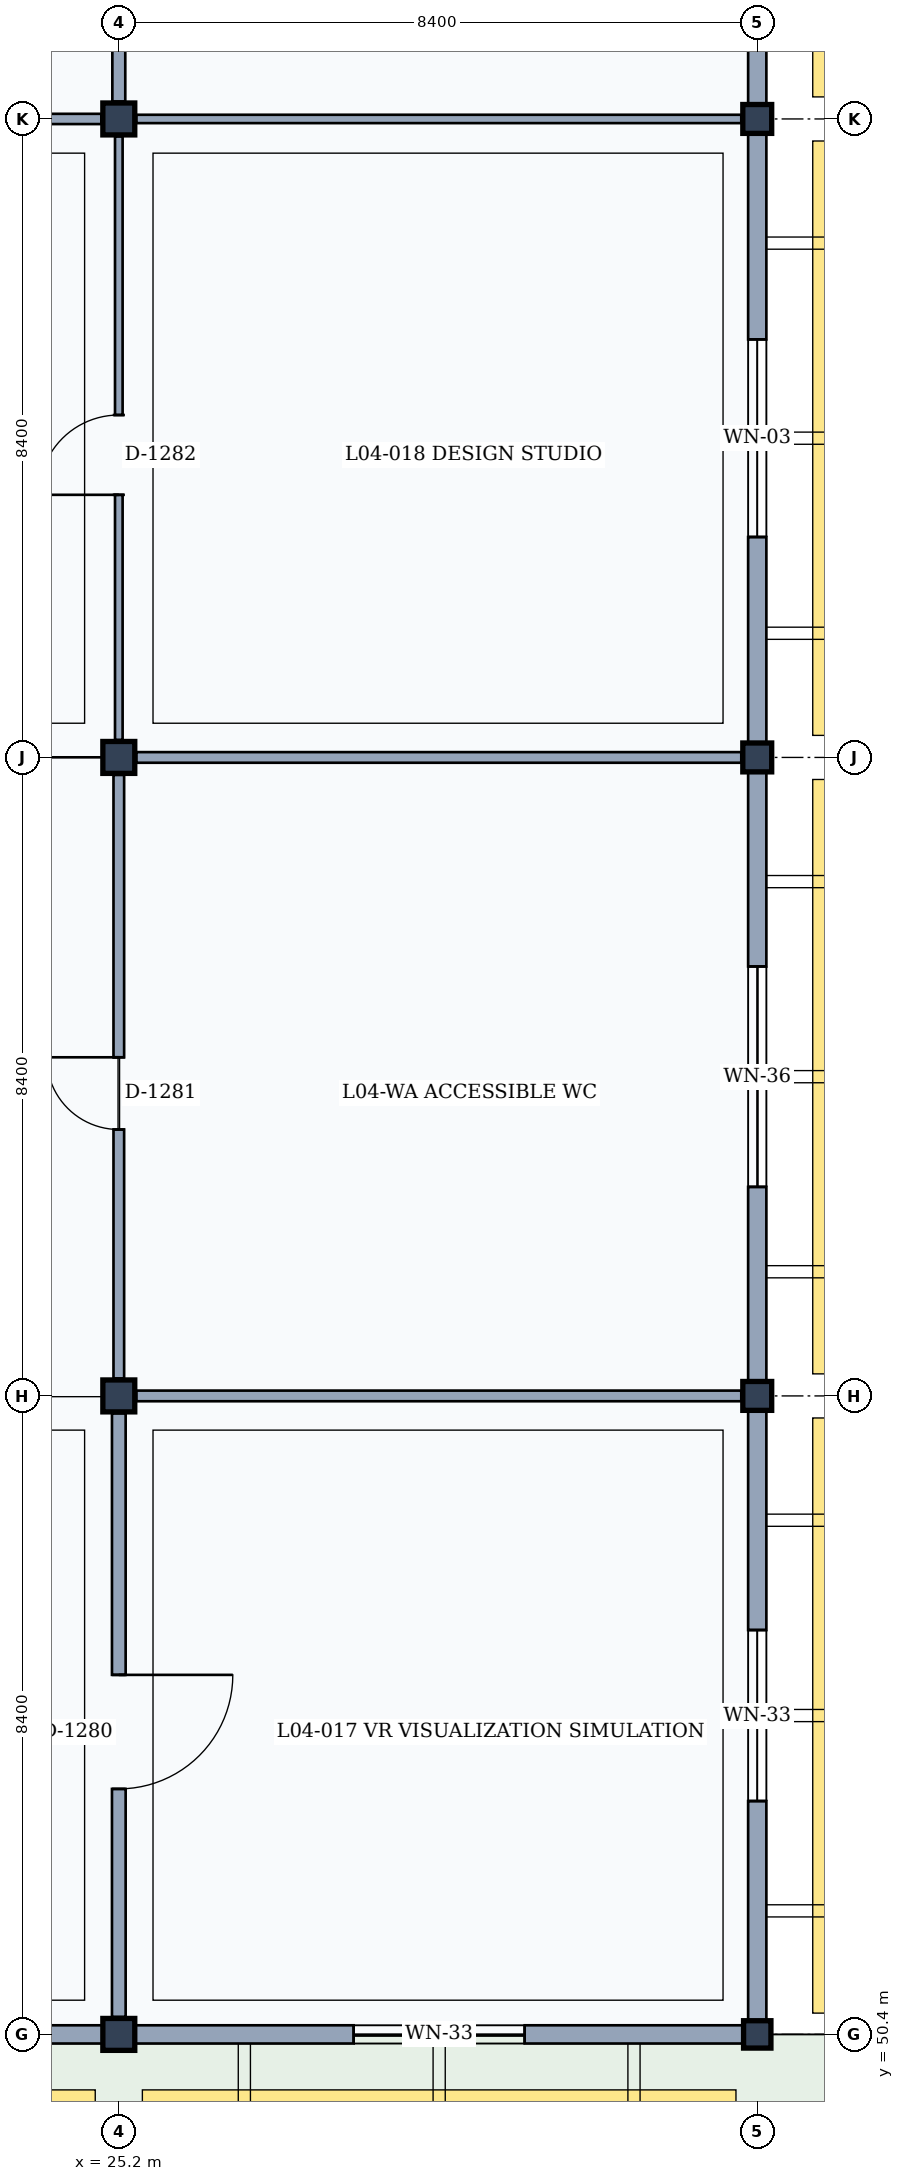
"""IFC4 building model, lengths in metres.
Left out: names, types, materials, properties, quantities, classifications, styles, units other than length and angle.
Written with IfcOpenShell. Run it as: python <this file> out.ifc"""

import sys

from ifc_helpers import new_model, si_unit, direction, frame, frame_2d, origin, origin_2d, place, context, subcontext, project, spatial, rectangle, extrude, element, fill, save


model = new_model("IFC4")
c1 = context("Model", 3, precision=1e-05, world=origin(), true_north=direction((0.0, 1.0)))
c2 = subcontext(c1, "Body", "Model", "MODEL_VIEW")
j1 = project(units=[si_unit("LENGTHUNIT", "METRE"), si_unit("PLANEANGLEUNIT", "RADIAN")], contexts=[c1])
p1 = place(None, origin())
s1 = spatial("IfcSite", under=j1, at=p1, CompositionType="ELEMENT")
p2 = place(p1, origin())
s2 = spatial("IfcBuilding", under=s1, at=p2, CompositionType="ELEMENT")
p3 = place(p2, frame((0.0, 0.0, 18.0)))
s3 = spatial("IfcBuildingStorey", under=s2, at=p3, CompositionType="ELEMENT", Elevation=18.0)
for number, where, z_axis, x_axis in (
    (1, (25.2, 50.4, 0.0), (0.0, 0.0, 1.0), (1.0, 0.0, 0.0)),
    (2, (25.2, 58.8, 0.0), (0.0, 0.0, 1.0), (1.0, 0.0, 0.0)),
    (3, (25.2, 67.2, 0.0), (0.0, 0.0, 1.0), (1.0, 0.0, 0.0)),
    (4, (25.2, 75.6, 0.0), (0.0, 0.0, 1.0), (1.0, 0.0, 0.0)),
):
    element("IfcColumn", number, at=place(p3, frame(where, z_axis=z_axis, x_axis=x_axis)), inside=s3, PredefinedType="COLUMN", context=c2, shape_type="SweptSolid", body=[
        extrude(rectangle(XDim=0.42, YDim=0.42, at=origin_2d()), origin(), (0.0, 0.0, 1.0), 4.2),
    ])
p4 = place(p3, frame((33.6, 50.4, 0.0), z_axis=(0.0, 0.0, 1.0), x_axis=(1.0, 0.0, 0.0)))
e5 = element("IfcColumn", 5, at=p4, inside=s3, PredefinedType="COLUMN", context=c2, shape_type="SweptSolid", body=[
    extrude(rectangle(XDim=0.36, YDim=0.36, at=origin_2d()), origin(), (0.0, 0.0, 1.0), 4.2),
])
for number, where, z_axis, x_axis in (
    (6, (33.6, 58.8, 0.0), (0.0, 0.0, 1.0), (1.0, 0.0, 0.0)),
    (7, (33.6, 67.2, 0.0), (0.0, 0.0, 1.0), (1.0, 0.0, 0.0)),
    (8, (33.6, 75.6, 0.0), (0.0, 0.0, 1.0), (1.0, 0.0, 0.0)),
):
    element("IfcColumn", number, at=place(p3, frame(where, z_axis=z_axis, x_axis=x_axis)), inside=s3, PredefinedType="COLUMN", context=c2, shape_type="SweptSolid", body=[
        extrude(rectangle(XDim=0.38, YDim=0.38, at=origin_2d()), origin(), (0.0, 0.0, 1.0), 4.2),
    ])
p5 = place(p3, frame((24.99, 50.4, 0.0), z_axis=(0.0, 0.0, 1.0), x_axis=(-1.0, 0.0, 0.0)))
e9 = element("IfcWall", 9, at=p5, inside=s3, PredefinedType="SOLIDWALL", context=c2, shape_type="SweptSolid", body=[
    extrude(rectangle(XDim=7.98, YDim=0.24, at=frame_2d((3.99, 0.0))), origin(), (0.0, 0.0, 1.0), 3.36),
])
p6 = place(p5, frame((2.615, 0.0, 0.9)))
e10 = element("IfcOpeningElement", 10, at=p6, cuts=e9, PredefinedType="OPENING", context=c2, shape_type="SweptSolid", body=[
    extrude(rectangle(XDim=2.75, YDim=1.85, at=frame_2d((1.375, 0.925))), frame((0.0, 0.13, 0.0), z_axis=(0.0, -1.0, 0.0), x_axis=(1.0, 0.0, 0.0)), (0.0, 0.0, 1.0), 0.26),
])
p7 = place(p3, frame((33.42, 50.4, 0.0), z_axis=(0.0, 0.0, 1.0), x_axis=(-1.0, 0.0, 0.0)))
e11 = element("IfcWall", 11, at=p7, inside=s3, PredefinedType="SOLIDWALL", context=c2, shape_type="SweptSolid", body=[
    extrude(rectangle(XDim=8.01, YDim=0.24, at=frame_2d((4.005, 0.0))), origin(), (0.0, 0.0, 1.0), 3.36),
])
p8 = place(p7, frame((2.88, 0.0, 0.9)))
e12 = element("IfcOpeningElement", 12, at=p8, cuts=e11, PredefinedType="OPENING", context=c2, shape_type="SweptSolid", body=[
    extrude(rectangle(XDim=2.25, YDim=1.6, at=frame_2d((1.125, 0.8))), frame((0.0, 0.13, 0.0), z_axis=(0.0, -1.0, 0.0), x_axis=(1.0, 0.0, 0.0)), (0.0, 0.0, 1.0), 0.26),
])
p9 = place(p3, frame((33.6, 58.61, 0.0), z_axis=(0.0, 0.0, 1.0), x_axis=(0.0, -1.0, 0.0)))
e13 = element("IfcWall", 13, at=p9, inside=s3, PredefinedType="SOLIDWALL", context=c2, shape_type="SweptSolid", body=[
    extrude(rectangle(XDim=8.03, YDim=0.24, at=frame_2d((4.015, 0.0))), origin(), (0.0, 0.0, 1.0), 3.36),
])
p10 = place(p9, frame((2.89, 0.0, 0.9)))
e14 = element("IfcOpeningElement", 14, at=p10, cuts=e13, PredefinedType="OPENING", context=c2, shape_type="SweptSolid", body=[
    extrude(rectangle(XDim=2.25, YDim=1.6, at=frame_2d((1.125, 0.8))), frame((0.0, 0.13, 0.0), z_axis=(0.0, -1.0, 0.0), x_axis=(1.0, 0.0, 0.0)), (0.0, 0.0, 1.0), 0.26),
])
p11 = place(p3, frame((33.6, 67.01, 0.0), z_axis=(0.0, 0.0, 1.0), x_axis=(0.0, -1.0, 0.0)))
e15 = element("IfcWall", 15, at=p11, inside=s3, PredefinedType="SOLIDWALL", context=c2, shape_type="SweptSolid", body=[
    extrude(rectangle(XDim=8.02, YDim=0.24, at=frame_2d((4.01, 0.0))), origin(), (0.0, 0.0, 1.0), 3.36),
])
p12 = place(p11, frame((2.56, 0.0, 0.9)))
e16 = element("IfcOpeningElement", 16, at=p12, cuts=e15, PredefinedType="OPENING", context=c2, shape_type="SweptSolid", body=[
    extrude(rectangle(XDim=2.9, YDim=1.75, at=frame_2d((1.45, 0.875))), frame((0.0, 0.13, 0.0), z_axis=(0.0, -1.0, 0.0), x_axis=(1.0, 0.0, 0.0)), (0.0, 0.0, 1.0), 0.26),
])
p13 = place(p3, frame((33.6, 75.41, 0.0), z_axis=(0.0, 0.0, 1.0), x_axis=(0.0, -1.0, 0.0)))
e17 = element("IfcWall", 17, at=p13, inside=s3, PredefinedType="SOLIDWALL", context=c2, shape_type="SweptSolid", body=[
    extrude(rectangle(XDim=8.02, YDim=0.24, at=frame_2d((4.01, 0.0))), origin(), (0.0, 0.0, 1.0), 3.36),
])
p14 = place(p13, frame((2.71, 0.0, 0.9)))
e18 = element("IfcOpeningElement", 18, at=p14, cuts=e17, PredefinedType="OPENING", context=c2, shape_type="SweptSolid", body=[
    extrude(rectangle(XDim=2.6, YDim=2.1, at=frame_2d((1.3, 1.05))), frame((0.0, 0.13, 0.0), z_axis=(0.0, -1.0, 0.0), x_axis=(1.0, 0.0, 0.0)), (0.0, 0.0, 1.0), 0.26),
])
p15 = place(p3, frame((33.6, 83.81, 0.0), z_axis=(0.0, 0.0, 1.0), x_axis=(0.0, -1.0, 0.0)))
e19 = element("IfcWall", 19, at=p15, inside=s3, PredefinedType="SOLIDWALL", context=c2, shape_type="SweptSolid", body=[
    extrude(rectangle(XDim=8.02, YDim=0.24, at=frame_2d((4.01, 0.0))), origin(), (0.0, 0.0, 1.0), 3.36),
])
p16 = place(p15, frame((3.51, 0.0, 0.9)))
e20 = element("IfcOpeningElement", 20, at=p16, cuts=e19, PredefinedType="OPENING", context=c2, shape_type="SweptSolid", body=[
    extrude(rectangle(XDim=1.0, YDim=1.4, at=frame_2d((0.5, 0.7))), frame((0.0, 0.13, 0.0), z_axis=(0.0, -1.0, 0.0), x_axis=(1.0, 0.0, 0.0)), (0.0, 0.0, 1.0), 0.26),
])
p17 = place(p3, frame((25.2, 50.63, 0.0), z_axis=(0.0, 0.0, 1.0), x_axis=(0.0, 1.0, 0.0)))
e21 = element("IfcWall", 21, at=p17, inside=s3, PredefinedType="PARTITIONING", context=c2, shape_type="SweptSolid", body=[
    extrude(rectangle(XDim=7.94, YDim=0.18, at=frame_2d((3.97, 0.0))), origin(), (0.0, 0.0, 1.0), 3.32),
])
p18 = place(p17, frame((3.0, 0.0, 0.0)))
e22 = element("IfcOpeningElement", 22, at=p18, cuts=e21, PredefinedType="OPENING", context=c2, shape_type="SweptSolid", body=[
    extrude(rectangle(XDim=1.5, YDim=2.3, at=frame_2d((0.75, 1.15))), frame((0.0, 0.1, 0.0), z_axis=(0.0, -1.0, 0.0), x_axis=(1.0, 0.0, 0.0)), (0.0, 0.0, 1.0), 0.2),
])
p19 = place(p3, frame((25.2, 59.03, 0.0), z_axis=(0.0, 0.0, 1.0), x_axis=(0.0, 1.0, 0.0)))
e23 = element("IfcWall", 23, at=p19, inside=s3, PredefinedType="PARTITIONING", context=c2, shape_type="SweptSolid", body=[
    extrude(rectangle(XDim=7.94, YDim=0.14, at=frame_2d((3.97, 0.0))), origin(), (0.0, 0.0, 1.0), 3.32),
])
p20 = place(p19, frame((3.275, 0.0, 0.0)))
e24 = element("IfcOpeningElement", 24, at=p20, cuts=e23, PredefinedType="OPENING", context=c2, shape_type="SweptSolid", body=[
    extrude(rectangle(XDim=0.95, YDim=2.15, at=frame_2d((0.475, 1.075))), frame((0.0, 0.08, 0.0), z_axis=(0.0, -1.0, 0.0), x_axis=(1.0, 0.0, 0.0)), (0.0, 0.0, 1.0), 0.16),
])
p21 = place(p3, frame((25.2, 67.43, 0.0), z_axis=(0.0, 0.0, 1.0), x_axis=(0.0, 1.0, 0.0)))
e25 = element("IfcWall", 25, at=p21, inside=s3, PredefinedType="MOVABLE", context=c2, shape_type="SweptSolid", body=[
    extrude(rectangle(XDim=7.94, YDim=0.1, at=frame_2d((3.97, 0.0))), origin(), (0.0, 0.0, 1.0), 3.32),
])
p22 = place(p21, frame((3.225, 0.0, 0.0)))
e26 = element("IfcOpeningElement", 26, at=p22, cuts=e25, PredefinedType="OPENING", context=c2, shape_type="SweptSolid", body=[
    extrude(rectangle(XDim=1.05, YDim=2.2, at=frame_2d((0.525, 1.1))), frame((0.0, 0.06, 0.0), z_axis=(0.0, -1.0, 0.0), x_axis=(1.0, 0.0, 0.0)), (0.0, 0.0, 1.0), 0.12),
])
p23 = place(p3, frame((17.03, 75.6, 0.0), z_axis=(0.0, 0.0, 1.0), x_axis=(1.0, 0.0, 0.0)))
e27 = element("IfcWall", 27, at=p23, inside=s3, PredefinedType="PARTITIONING", context=c2, shape_type="SweptSolid", body=[
    extrude(rectangle(XDim=7.94, YDim=0.135, at=frame_2d((3.97, 0.0))), origin(), (0.0, 0.0, 1.0), 3.32),
])
p24 = place(p3, frame((25.2, 75.83, 0.0), z_axis=(0.0, 0.0, 1.0), x_axis=(0.0, 1.0, 0.0)))
e28 = element("IfcWall", 28, at=p24, inside=s3, PredefinedType="PARTITIONING", context=c2, shape_type="SweptSolid", body=[
    extrude(rectangle(XDim=7.94, YDim=0.17, at=frame_2d((3.97, 0.0))), origin(), (0.0, 0.0, 1.0), 3.32),
])
for number, where, z_axis, x_axis in (
    (29, (25.43, 58.8, 0.0), (0.0, 0.0, 1.0), (1.0, 0.0, 0.0)),
    (30, (25.43, 67.2, 0.0), (0.0, 0.0, 1.0), (1.0, 0.0, 0.0)),
):
    element("IfcWall", number, at=place(p3, frame(where, z_axis=z_axis, x_axis=x_axis)), inside=s3, PredefinedType="PARTITIONING", context=c2, shape_type="SweptSolid", body=[
        extrude(rectangle(XDim=7.96, YDim=0.14, at=frame_2d((3.98, 0.0))), origin(), (0.0, 0.0, 1.0), 3.32),
    ])
p25 = place(p3, frame((25.43, 75.6, 0.0), z_axis=(0.0, 0.0, 1.0), x_axis=(1.0, 0.0, 0.0)))
e31 = element("IfcWall", 31, at=p25, inside=s3, PredefinedType="PARTITIONING", context=c2, shape_type="SweptSolid", body=[
    extrude(rectangle(XDim=7.96, YDim=0.11, at=frame_2d((3.98, 0.0))), origin(), (0.0, 0.0, 1.0), 3.32),
])
p26 = place(p8, origin())
e32 = element("IfcWindow", 32, at=p26, inside=s3, PartitioningType="SINGLE_PANEL", PredefinedType="WINDOW", context=c2, shape_type="SweptSolid", body=[
    extrude(rectangle(XDim=2.25, YDim=1.6, at=frame_2d((1.125, 0.8))), frame((0.0, 0.03, 0.0), z_axis=(0.0, -1.0, 0.0), x_axis=(1.0, 0.0, 0.0)), (0.0, 0.0, 1.0), 0.06),
])
fill(e12, e32)
p27 = place(p10, origin())
e33 = element("IfcWindow", 33, at=p27, inside=s3, PartitioningType="SINGLE_PANEL", PredefinedType="WINDOW", context=c2, shape_type="SweptSolid", body=[
    extrude(rectangle(XDim=2.25, YDim=1.6, at=frame_2d((1.125, 0.8))), frame((0.0, 0.03, 0.0), z_axis=(0.0, -1.0, 0.0), x_axis=(1.0, 0.0, 0.0)), (0.0, 0.0, 1.0), 0.06),
])
fill(e14, e33)
p28 = place(p12, origin())
e34 = element("IfcWindow", 34, at=p28, inside=s3, PartitioningType="SINGLE_PANEL", PredefinedType="WINDOW", context=c2, shape_type="SweptSolid", body=[
    extrude(rectangle(XDim=2.9, YDim=1.75, at=frame_2d((1.45, 0.875))), frame((0.0, 0.03, 0.0), z_axis=(0.0, -1.0, 0.0), x_axis=(1.0, 0.0, 0.0)), (0.0, 0.0, 1.0), 0.06),
])
fill(e16, e34)
p29 = place(p14, origin())
e35 = element("IfcWindow", 35, at=p29, inside=s3, PartitioningType="SINGLE_PANEL", PredefinedType="WINDOW", context=c2, shape_type="SweptSolid", body=[
    extrude(rectangle(XDim=2.6, YDim=2.1, at=frame_2d((1.3, 1.05))), frame((0.0, 0.03, 0.0), z_axis=(0.0, -1.0, 0.0), x_axis=(1.0, 0.0, 0.0)), (0.0, 0.0, 1.0), 0.06),
])
fill(e18, e35)
p30 = place(p18, frame((1.5, 0.0, 0.0), z_axis=(0.0, 0.0, 1.0), x_axis=(-1.0, 0.0, 0.0)))
e36 = element("IfcDoor", 36, at=p30, inside=s3, OperationType="SINGLE_SWING_LEFT", PredefinedType="DOOR", context=c2, shape_type="SweptSolid", body=[
    extrude(rectangle(XDim=1.5, YDim=2.3, at=frame_2d((0.75, 1.15))), frame((0.0, 0.025, 0.0), z_axis=(0.0, -1.0, 0.0), x_axis=(1.0, 0.0, 0.0)), (0.0, 0.0, 1.0), 0.05),
])
fill(e22, e36)
p31 = place(p20, origin())
e37 = element("IfcDoor", 37, at=p31, inside=s3, OperationType="SINGLE_SWING_RIGHT", PredefinedType="DOOR", context=c2, shape_type="SweptSolid", body=[
    extrude(rectangle(XDim=0.95, YDim=2.15, at=frame_2d((0.475, 1.075))), frame((0.0, 0.025, 0.0), z_axis=(0.0, -1.0, 0.0), x_axis=(1.0, 0.0, 0.0)), (0.0, 0.0, 1.0), 0.05),
])
fill(e24, e37)
p32 = place(p22, origin())
e38 = element("IfcDoor", 38, at=p32, inside=s3, OperationType="SINGLE_SWING_LEFT", PredefinedType="DOOR", context=c2, shape_type="SweptSolid", body=[
    extrude(rectangle(XDim=1.05, YDim=2.2, at=frame_2d((0.525, 1.1))), frame((0.0, 0.025, 0.0), z_axis=(0.0, -1.0, 0.0), x_axis=(1.0, 0.0, 0.0)), (0.0, 0.0, 1.0), 0.05),
])
fill(e26, e38)
save(model, sys.argv[1])
